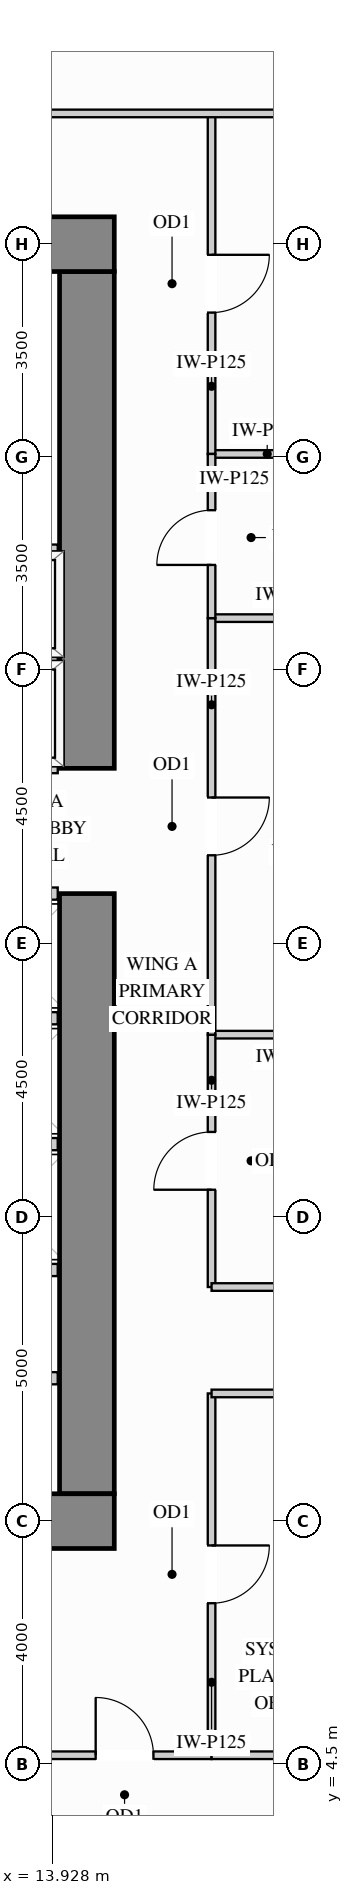
"""IFC4 building model, lengths in metres.
Left out: names, types, materials, properties, quantities, classifications, styles, units other than length and angle.
Written with IfcOpenShell. Run it as: python <this file> out.ifc"""

import sys

from ifc_helpers import new_model, si_unit, direction, frame, frame_2d, origin, place, context, subcontext, project, spatial, rectangle, extrude, source, transform, mapped, element, fill, save


model = new_model("IFC4")
c1 = context("Model", 3, precision=1e-05, world=origin(), true_north=direction((0.0, 1.0)))
c2 = subcontext(c1, "Body", "Model", "MODEL_VIEW")
j1 = project(units=[si_unit("LENGTHUNIT", "METRE"), si_unit("PLANEANGLEUNIT", "RADIAN")], contexts=[c1])
p1 = place(None, origin())
s1 = spatial("IfcSite", under=j1, at=p1, CompositionType="ELEMENT")
p2 = place(p1, origin())
s2 = spatial("IfcBuilding", under=s1, at=p2, CompositionType="ELEMENT")
p3 = place(p2, frame((0.0, 0.0, 65.7)))
s3 = spatial("IfcBuildingStorey", under=s2, at=p3, CompositionType="ELEMENT", Elevation=65.7)
m1 = source(origin(), c2, "Body", "SweptSolid", [
    extrude(rectangle(XDim=9.87, YDim=0.9, at=frame_2d((4.935, 0.0))), origin(), (0.0, 0.0, 1.0), 3.38),
])
p4 = place(p3, frame((14.5, 8.95, 0.0), z_axis=(0.0, 0.0, 1.0), x_axis=(0.0, 1.0, 0.0)))
e1 = element("IfcWall", 1, at=p4, inside=s3, PredefinedType="SHEAR", context=c2, shape_type="MappedRepresentation", body=[
    mapped(m1, transform((0.0, 0.0, 0.0), x_axis=(1.0, 0.0, 0.0), y_axis=(0.0, 1.0, 0.0), z_axis=(0.0, 0.0, 1.0))),
])
m2 = source(origin(), c2, "Body", "SweptSolid", [
    extrude(rectangle(XDim=8.17, YDim=0.9, at=frame_2d((4.085, 0.0))), origin(), (0.0, 0.0, 1.0), 3.38),
])
p5 = place(p3, frame((14.5, 20.88, 0.0), z_axis=(0.0, 0.0, 1.0), x_axis=(0.0, 1.0, 0.0)))
e2 = element("IfcWall", 2, at=p5, inside=s3, PredefinedType="SHEAR", context=c2, shape_type="MappedRepresentation", body=[
    mapped(m2, transform((0.0, 0.0, 0.0), x_axis=(1.0, 0.0, 0.0), y_axis=(0.0, 1.0, 0.0), z_axis=(0.0, 0.0, 1.0))),
])
m3 = source(origin(), c2, "Body", "SweptSolid", [
    extrude(rectangle(XDim=10.9, YDim=0.9, at=frame_2d((5.45, 0.0))), origin(), (0.0, 0.0, 1.0), 3.38),
])
for number, where, z_axis, x_axis in (
    (3, (4.05, 29.5, 0.0), (0.0, 0.0, 1.0), (1.0, 0.0, 0.0)),
    (4, (4.05, 8.5, 0.0), (0.0, 0.0, 1.0), (1.0, 0.0, 0.0)),
):
    element("IfcWall", number, at=place(p3, frame(where, z_axis=z_axis, x_axis=x_axis)), inside=s3, PredefinedType="SHEAR", context=c2, shape_type="MappedRepresentation", body=[
        mapped(m3, transform((0.0, 0.0, 0.0), x_axis=(1.0, 0.0, 0.0), y_axis=(0.0, 1.0, 0.0), z_axis=(0.0, 0.0, 1.0))),
    ])
m4 = source(origin(), c2, "Body", "SweptSolid", [
    extrude(rectangle(XDim=2.6, YDim=0.125, at=frame_2d((1.3, 0.0))), origin(), (0.0, 0.0, 1.0), 2.896),
])
p6 = place(p3, frame((16.55, 16.5, 0.0), z_axis=(0.0, 0.0, 1.0), x_axis=(1.0, 0.0, 0.0)))
e5 = element("IfcWall", 5, at=p6, inside=s3, PredefinedType="PARTITIONING", context=c2, shape_type="MappedRepresentation", body=[
    mapped(m4, transform((0.0, 0.0, 0.0), x_axis=(1.0, 0.0, 0.0), y_axis=(0.0, 1.0, 0.0), z_axis=(0.0, 0.0, 1.0))),
])
m5 = source(origin(), c2, "Body", "SweptSolid", [
    extrude(rectangle(XDim=2.598, YDim=0.125, at=frame_2d((1.299, 0.0))), origin(), (0.0, 0.0, 1.0), 3.365),
])
for number, where, z_axis, x_axis in (
    (6, (16.55, 23.35, 0.0), (0.0, 0.0, 1.0), (1.0, 0.0, 0.0)),
    (7, (16.55, 26.05, 0.0), (0.0, 0.0, 1.0), (1.0, 0.0, 0.0)),
):
    element("IfcWall", number, at=place(p3, frame(where, z_axis=z_axis, x_axis=x_axis)), inside=s3, PredefinedType="PARTITIONING", context=c2, shape_type="MappedRepresentation", body=[
        mapped(m5, transform((0.0, 0.0, 0.0), x_axis=(1.0, 0.0, 0.0), y_axis=(0.0, 1.0, 0.0), z_axis=(0.0, 0.0, 1.0))),
    ])
p7 = place(p3, frame((16.55, 12.35, 0.0), z_axis=(0.0, 0.0, 1.0), x_axis=(0.0, 1.0, 0.0)))
e8 = element("IfcWall", 8, at=p7, inside=s3, PredefinedType="PARTITIONING", context=c2, shape_type="SweptSolid", body=[
    extrude(rectangle(XDim=4.15, YDim=0.125, at=frame_2d((2.075, 0.0))), origin(), (0.0, 0.0, 1.0), 3.365),
])
p8 = place(p7, frame((1.6, 0.0, 0.0)))
e9 = element("IfcOpeningElement", 9, at=p8, cuts=e8, PredefinedType="OPENING", context=c2, shape_type="SweptSolid", body=[
    extrude(rectangle(XDim=0.95, YDim=2.15, at=frame_2d((0.475, 1.075))), frame((0.0, 0.073, 0.0), z_axis=(0.0, -1.0, 0.0), x_axis=(1.0, 0.0, 0.0)), (0.0, 0.0, 1.0), 0.145),
])
p9 = place(p3, frame((16.55, 16.5, 0.0), z_axis=(0.0, 0.0, 1.0), x_axis=(0.0, 1.0, 0.0)))
e10 = element("IfcWall", 10, at=p9, inside=s3, PredefinedType="PARTITIONING", context=c2, shape_type="SweptSolid", body=[
    extrude(rectangle(XDim=6.85, YDim=0.125, at=frame_2d((3.425, 0.0))), origin(), (0.0, 0.0, 1.0), 3.365),
])
p10 = place(p9, frame((2.95, 0.0, 0.0)))
e11 = element("IfcOpeningElement", 11, at=p10, cuts=e10, PredefinedType="OPENING", context=c2, shape_type="SweptSolid", body=[
    extrude(rectangle(XDim=0.95, YDim=2.15, at=frame_2d((0.475, 1.075))), frame((0.0, 0.073, 0.0), z_axis=(0.0, -1.0, 0.0), x_axis=(1.0, 0.0, 0.0)), (0.0, 0.0, 1.0), 0.145),
])
p11 = place(p3, frame((16.55, 26.05, 0.0), z_axis=(0.0, 0.0, 1.0), x_axis=(0.0, 1.0, 0.0)))
e12 = element("IfcWall", 12, at=p11, inside=s3, PredefinedType="PARTITIONING", context=c2, shape_type="SweptSolid", body=[
    extrude(rectangle(XDim=5.6, YDim=0.125, at=frame_2d((2.8, 0.0))), origin(), (0.0, 0.0, 1.0), 3.365),
])
p12 = place(p11, frame((2.325, 0.0, 0.0)))
e13 = element("IfcOpeningElement", 13, at=p12, cuts=e12, PredefinedType="OPENING", context=c2, shape_type="SweptSolid", body=[
    extrude(rectangle(XDim=0.95, YDim=2.15, at=frame_2d((0.475, 1.075))), frame((0.0, 0.073, 0.0), z_axis=(0.0, -1.0, 0.0), x_axis=(1.0, 0.0, 0.0)), (0.0, 0.0, 1.0), 0.145),
])
p13 = place(p3, frame((16.55, 4.65, 0.0), z_axis=(0.0, 0.0, 1.0), x_axis=(0.0, 1.0, 0.0)))
e14 = element("IfcWall", 14, at=p13, inside=s3, PredefinedType="PARTITIONING", context=c2, shape_type="SweptSolid", body=[
    extrude(rectangle(XDim=5.95, YDim=0.125, at=frame_2d((2.975, 0.0))), origin(), (0.0, 0.0, 1.0), 3.365),
])
p14 = place(p13, frame((2.5, 0.0, 0.0)))
e15 = element("IfcOpeningElement", 15, at=p14, cuts=e14, PredefinedType="OPENING", context=c2, shape_type="SweptSolid", body=[
    extrude(rectangle(XDim=0.95, YDim=2.15, at=frame_2d((0.475, 1.075))), frame((0.0, 0.073, 0.0), z_axis=(0.0, -1.0, 0.0), x_axis=(1.0, 0.0, 0.0)), (0.0, 0.0, 1.0), 0.145),
])
p15 = place(p3, frame((16.55, 23.35, 0.0), z_axis=(0.0, 0.0, 1.0), x_axis=(0.0, 1.0, 0.0)))
e16 = element("IfcWall", 16, at=p15, inside=s3, PredefinedType="PARTITIONING", context=c2, shape_type="SweptSolid", body=[
    extrude(rectangle(XDim=2.7, YDim=0.125, at=frame_2d((1.35, 0.0))), origin(), (0.0, 0.0, 1.0), 3.365),
])
p16 = place(p15, frame((0.875, 0.0, 0.0)))
e17 = element("IfcOpeningElement", 17, at=p16, cuts=e16, PredefinedType="OPENING", context=c2, shape_type="SweptSolid", body=[
    extrude(rectangle(XDim=0.9, YDim=2.15, at=frame_2d((0.45, 1.075))), frame((0.0, 0.073, 0.0), z_axis=(0.0, -1.0, 0.0), x_axis=(1.0, 0.0, 0.0)), (0.0, 0.0, 1.0), 0.145),
])
m6 = source(origin(), c2, "Body", "SweptSolid", [
    extrude(rectangle(XDim=12.598, YDim=0.125, at=frame_2d((6.299, 0.0))), origin(), (0.0, 0.0, 1.0), 2.828),
])
p17 = place(p3, frame((6.55, 31.65, 0.0), z_axis=(0.0, 0.0, 1.0), x_axis=(1.0, 0.0, 0.0)))
e18 = element("IfcWall", 18, at=p17, inside=s3, PredefinedType="PARTITIONING", context=c2, shape_type="MappedRepresentation", body=[
    mapped(m6, transform((0.0, 0.0, 0.0), x_axis=(1.0, 0.0, 0.0), y_axis=(0.0, 1.0, 0.0), z_axis=(0.0, 0.0, 1.0))),
])
m7 = source(origin(), c2, "Body", "SweptSolid", [
    extrude(rectangle(XDim=2.95, YDim=0.125, at=frame_2d((1.475, 0.0))), origin(), (0.0, 0.0, 1.0), 3.365),
])
for number, where, z_axis, x_axis in (
    (19, (16.55, 12.35, 0.0), (0.0, 0.0, 1.0), (1.0, 0.0, 0.0)),
    (20, (16.55, 10.6, 0.0), (0.0, 0.0, 1.0), (1.0, 0.0, 0.0)),
):
    element("IfcWall", number, at=place(p3, frame(where, z_axis=z_axis, x_axis=x_axis)), inside=s3, PredefinedType="PARTITIONING", context=c2, shape_type="MappedRepresentation", body=[
        mapped(m7, transform((0.0, 0.0, 0.0), x_axis=(1.0, 0.0, 0.0), y_axis=(0.0, 1.0, 0.0), z_axis=(0.0, 0.0, 1.0))),
    ])
p18 = place(p3, frame((13.688, 4.65, 0.0), z_axis=(0.0, 0.0, 1.0), x_axis=(1.0, 0.0, 0.0)))
e21 = element("IfcWall", 21, at=p18, inside=s3, PredefinedType="PARTITIONING", context=c2, shape_type="SweptSolid", body=[
    extrude(rectangle(XDim=2.862, YDim=0.125, at=frame_2d((1.431, 0.0))), origin(), (0.0, 0.0, 1.0), 2.828),
])
p19 = place(p18, frame((0.956, 0.0, 0.0)))
e22 = element("IfcOpeningElement", 22, at=p19, cuts=e21, PredefinedType="OPENING", context=c2, shape_type="SweptSolid", body=[
    extrude(rectangle(XDim=0.95, YDim=2.15, at=frame_2d((0.475, 1.075))), frame((0.0, 0.073, 0.0), z_axis=(0.0, -1.0, 0.0), x_axis=(1.0, 0.0, 0.0)), (0.0, 0.0, 1.0), 0.145),
])
m8 = source(origin(), c2, "Body", "SweptSolid", [
    extrude(rectangle(XDim=2.598, YDim=0.125, at=frame_2d((1.299, 0.0))), origin(), (0.0, 0.0, 1.0), 2.828),
])
p20 = place(p3, frame((16.55, 4.65, 0.0), z_axis=(0.0, 0.0, 1.0), x_axis=(1.0, 0.0, 0.0)))
e23 = element("IfcWall", 23, at=p20, inside=s3, PredefinedType="PARTITIONING", context=c2, shape_type="MappedRepresentation", body=[
    mapped(m8, transform((0.0, 0.0, 0.0), x_axis=(1.0, 0.0, 0.0), y_axis=(0.0, 1.0, 0.0), z_axis=(0.0, 0.0, 1.0))),
])
m9 = source(origin(), c2, "Body", "SweptSolid", [
    extrude(rectangle(XDim=1.6, YDim=0.2, at=frame_2d((0.8, 0.0))), origin(), (0.0, 0.0, 1.0), 3.365),
])
p21 = place(p3, frame((12.42, 10.85, 0.0), z_axis=(0.0, 0.0, 1.0), x_axis=(1.0, 0.0, 0.0)))
e24 = element("IfcWall", 24, at=p21, inside=s3, PredefinedType="PARTITIONING", context=c2, shape_type="MappedRepresentation", body=[
    mapped(m9, transform((0.0, 0.0, 0.0), x_axis=(1.0, 0.0, 0.0), y_axis=(0.0, 1.0, 0.0), z_axis=(0.0, 0.0, 1.0))),
])
m10 = source(origin(), c2, "Body", "SweptSolid", [
    extrude(rectangle(XDim=2.19, YDim=0.2, at=frame_2d((1.095, 0.0))), origin(), (0.0, 0.0, 1.0), 3.365),
])
for number, where, z_axis, x_axis in (
    (25, (11.83, 22.66, 0.0), (0.0, 0.0, 1.0), (1.0, 0.0, 0.0)),
    (26, (11.83, 20.9, 0.0), (0.0, 0.0, 1.0), (1.0, 0.0, 0.0)),
    (27, (11.83, 24.46, 0.0), (0.0, 0.0, 1.0), (1.0, 0.0, 0.0)),
):
    element("IfcWall", number, at=place(p3, frame(where, z_axis=z_axis, x_axis=x_axis)), inside=s3, PredefinedType="PARTITIONING", context=c2, shape_type="MappedRepresentation", body=[
        mapped(m10, transform((0.0, 0.0, 0.0), x_axis=(1.0, 0.0, 0.0), y_axis=(0.0, 1.0, 0.0), z_axis=(0.0, 0.0, 1.0))),
    ])
m11 = source(origin(), c2, "Body", "SweptSolid", [
    extrude(rectangle(XDim=1.79, YDim=0.2, at=frame_2d((0.895, 0.0))), origin(), (0.0, 0.0, 1.0), 3.365),
])
for number, where, z_axis, x_axis in (
    (28, (12.23, 14.7, 0.0), (0.0, 0.0, 1.0), (1.0, 0.0, 0.0)),
    (29, (12.23, 12.63, 0.0), (0.0, 0.0, 1.0), (1.0, 0.0, 0.0)),
    (30, (12.23, 16.77, 0.0), (0.0, 0.0, 1.0), (1.0, 0.0, 0.0)),
    (31, (12.23, 18.82, 0.0), (0.0, 0.0, 1.0), (1.0, 0.0, 0.0)),
):
    element("IfcWall", number, at=place(p3, frame(where, z_axis=z_axis, x_axis=x_axis)), inside=s3, PredefinedType="PARTITIONING", context=c2, shape_type="MappedRepresentation", body=[
        mapped(m11, transform((0.0, 0.0, 0.0), x_axis=(1.0, 0.0, 0.0), y_axis=(0.0, 1.0, 0.0), z_axis=(0.0, 0.0, 1.0))),
    ])
m12 = source(origin(), c2, "Body", "SweptSolid", [
    extrude(rectangle(XDim=0.95, YDim=2.15, at=frame_2d((0.475, 1.075))), frame((0.0, 0.025, 0.0), z_axis=(0.0, -1.0, 0.0), x_axis=(1.0, 0.0, 0.0)), (0.0, 0.0, 1.0), 0.05),
])
p22 = place(p14, origin())
e32 = element("IfcDoor", 32, at=p22, inside=s3, OperationType="SINGLE_SWING_RIGHT", PredefinedType="DOOR", context=c2, shape_type="MappedRepresentation", body=[
    mapped(m12, transform((0.0, 0.0, 0.0), x_axis=(1.0, 0.0, 0.0), y_axis=(0.0, 1.0, 0.0), z_axis=(0.0, 0.0, 1.0))),
])
fill(e15, e32)
p23 = place(p8, origin())
e33 = element("IfcDoor", 33, at=p23, inside=s3, OperationType="SINGLE_SWING_LEFT", PredefinedType="DOOR", context=c2, shape_type="MappedRepresentation", body=[
    mapped(m12, transform((0.0, 0.0, 0.0), x_axis=(1.0, 0.0, 0.0), y_axis=(0.0, 1.0, 0.0), z_axis=(0.0, 0.0, 1.0))),
])
fill(e9, e33)
p24 = place(p10, origin())
e34 = element("IfcDoor", 34, at=p24, inside=s3, OperationType="SINGLE_SWING_RIGHT", PredefinedType="DOOR", context=c2, shape_type="MappedRepresentation", body=[
    mapped(m12, transform((0.0, 0.0, 0.0), x_axis=(1.0, 0.0, 0.0), y_axis=(0.0, 1.0, 0.0), z_axis=(0.0, 0.0, 1.0))),
])
fill(e11, e34)
p25 = place(p12, origin())
e35 = element("IfcDoor", 35, at=p25, inside=s3, OperationType="SINGLE_SWING_RIGHT", PredefinedType="DOOR", context=c2, shape_type="MappedRepresentation", body=[
    mapped(m12, transform((0.0, 0.0, 0.0), x_axis=(1.0, 0.0, 0.0), y_axis=(0.0, 1.0, 0.0), z_axis=(0.0, 0.0, 1.0))),
])
fill(e13, e35)
p26 = place(p19, origin())
e36 = element("IfcDoor", 36, at=p26, inside=s3, OperationType="SINGLE_SWING_LEFT", PredefinedType="DOOR", context=c2, shape_type="MappedRepresentation", body=[
    mapped(m12, transform((0.0, 0.0, 0.0), x_axis=(1.0, 0.0, 0.0), y_axis=(0.0, 1.0, 0.0), z_axis=(0.0, 0.0, 1.0))),
])
fill(e22, e36)
m13 = source(origin(), c2, "Body", "SweptSolid", [
    extrude(rectangle(XDim=0.9, YDim=2.15, at=frame_2d((0.45, 1.075))), frame((0.0, 0.025, 0.0), z_axis=(0.0, -1.0, 0.0), x_axis=(1.0, 0.0, 0.0)), (0.0, 0.0, 1.0), 0.05),
])
p27 = place(p16, origin())
e37 = element("IfcDoor", 37, at=p27, inside=s3, OperationType="SINGLE_SWING_LEFT", PredefinedType="DOOR", context=c2, shape_type="MappedRepresentation", body=[
    mapped(m13, transform((0.0, 0.0, 0.0), x_axis=(1.0, 0.0, 0.0), y_axis=(0.0, 1.0, 0.0), z_axis=(0.0, 0.0, 1.0))),
])
fill(e17, e37)
save(model, sys.argv[1])
